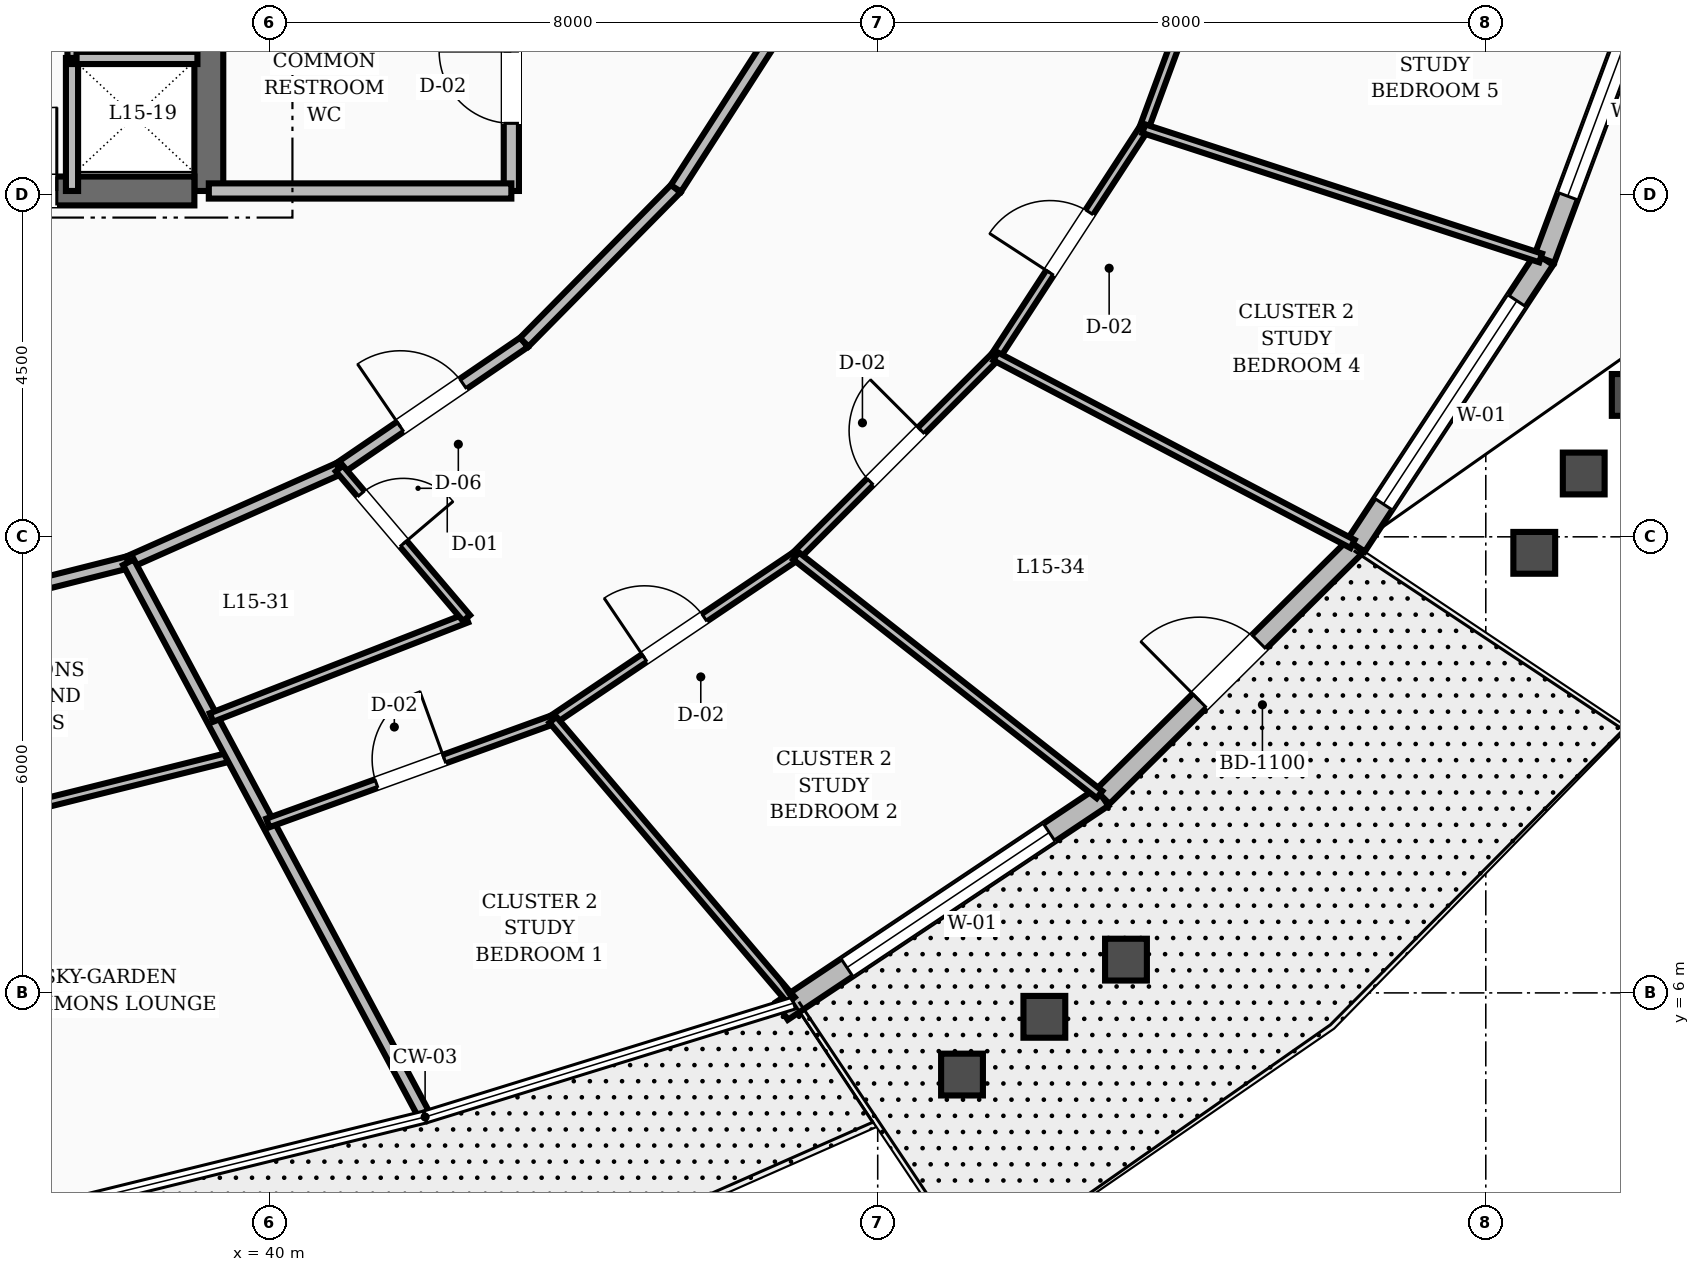
"""IFC4 building model, lengths in metres.
Left out: names, types, materials, properties, quantities, classifications, styles, units other than length and angle.
Written with IfcOpenShell. Run it as: python <this file> out.ifc"""

import sys

from ifc_helpers import new_model, si_unit, direction, frame, frame_2d, origin, place, context, subcontext, project, spatial, rectangle, extrude, element, fill, save


model = new_model("IFC4")
c1 = context("Model", 3, precision=1e-05, world=origin(), true_north=direction((0.0, 1.0)))
c2 = subcontext(c1, "Body", "Model", "MODEL_VIEW")
j1 = project(units=[si_unit("LENGTHUNIT", "METRE"), si_unit("PLANEANGLEUNIT", "RADIAN")], contexts=[c1])
p1 = place(None, origin())
s1 = spatial("IfcSite", under=j1, at=p1, CompositionType="ELEMENT")
p2 = place(p1, origin())
s2 = spatial("IfcBuilding", under=s1, at=p2, CompositionType="ELEMENT")
p3 = place(p2, frame((0.0, 0.0, 62.8)))
s3 = spatial("IfcBuildingStorey", under=s2, at=p3, CompositionType="ELEMENT", Elevation=62.8)
p4 = place(p3, frame((39.2, 16.55, 0.0), z_axis=(0.0, 0.0, 1.0), x_axis=(0.0, 1.0, 0.0)))
e1 = element("IfcWall", 1, at=p4, inside=s3, PredefinedType="SHEAR", context=c2, shape_type="SweptSolid", body=[
    extrude(rectangle(XDim=6.3, YDim=0.38, at=frame_2d((3.15, 0.0))), origin(), (0.0, 0.0, 1.0), 3.6),
])
p5 = place(p3, frame((35.8, 16.55, 0.0), z_axis=(0.0, 0.0, 1.0), x_axis=(1.0, 0.0, 0.0)))
e2 = element("IfcWall", 2, at=p5, inside=s3, PredefinedType="SHEAR", context=c2, shape_type="SweptSolid", body=[
    extrude(rectangle(XDim=3.21, YDim=0.38, at=frame_2d((1.605, 0.0))), origin(), (0.0, 0.0, 1.0), 3.6),
])
p6 = place(p5, frame((0.3, 0.0, 0.0)))
e3 = element("IfcOpeningElement", 3, at=p6, cuts=e2, PredefinedType="OPENING", context=c2, shape_type="SweptSolid", body=[
    extrude(rectangle(XDim=1.1, YDim=2.1, at=frame_2d((0.55, 1.05))), frame((0.0, 0.2, 0.0), z_axis=(0.0, -1.0, 0.0), x_axis=(1.0, 0.0, 0.0)), (0.0, 0.0, 1.0), 0.4),
])
p7 = place(p3, frame((46.74, 5.762, 0.0), z_axis=(0.0, 0.0, 1.0), x_axis=(0.831679795374, 0.555255542941, 0.0)))
e4 = element("IfcWall", 4, at=p7, inside=s3, PredefinedType="STANDARD", context=c2, shape_type="SweptSolid", body=[
    extrude(rectangle(XDim=5.071, YDim=0.28, at=frame_2d((2.536, 0.0))), origin(), (0.0, 0.0, 1.0), 2.71),
])
p8 = place(p7, frame((1.029, 0.0, 0.8)))
e5 = element("IfcOpeningElement", 5, at=p8, cuts=e4, PredefinedType="OPENING", context=c2, shape_type="SweptSolid", body=[
    extrude(rectangle(XDim=3.2, YDim=1.65, at=frame_2d((1.6, 0.825))), frame((0.0, 0.15, 0.0), z_axis=(0.0, -1.0, 0.0), x_axis=(1.0, 0.0, 0.0)), (0.0, 0.0, 1.0), 0.3),
])
p9 = place(p3, frame((50.958, 8.578, 0.0), z_axis=(0.0, 0.0, 1.0), x_axis=(0.710194142887, 0.704005880238, 0.0)))
e6 = element("IfcWall", 6, at=p9, inside=s3, PredefinedType="STANDARD", context=c2, shape_type="SweptSolid", body=[
    extrude(rectangle(XDim=4.695, YDim=0.26, at=frame_2d((2.347, 0.0))), origin(), (0.0, 0.0, 1.0), 2.71),
])
p10 = place(p9, frame((1.797, 0.0, 0.0)))
e7 = element("IfcOpeningElement", 7, at=p10, cuts=e6, PredefinedType="OPENING", context=c2, shape_type="SweptSolid", body=[
    extrude(rectangle(XDim=1.1, YDim=2.15, at=frame_2d((0.55, 1.075))), frame((0.0, 0.14, 0.0), z_axis=(0.0, -1.0, 0.0), x_axis=(1.0, 0.0, 0.0)), (0.0, 0.0, 1.0), 0.28),
])
p11 = place(p3, frame((54.292, 11.883, 0.0), z_axis=(0.0, 0.0, 1.0), x_axis=(0.54914333256, 0.835728185659, 0.0)))
e8 = element("IfcWall", 8, at=p11, inside=s3, PredefinedType="STANDARD", context=c2, shape_type="SweptSolid", body=[
    extrude(rectangle(XDim=4.512, YDim=0.28, at=frame_2d((2.256, 0.0))), origin(), (0.0, 0.0, 1.0), 2.71),
])
p12 = place(p11, frame((0.656, 0.0, 0.8)))
e9 = element("IfcOpeningElement", 9, at=p12, cuts=e8, PredefinedType="OPENING", context=c2, shape_type="SweptSolid", body=[
    extrude(rectangle(XDim=3.2, YDim=1.65, at=frame_2d((1.6, 0.825))), frame((0.0, 0.15, 0.0), z_axis=(0.0, -1.0, 0.0), x_axis=(1.0, 0.0, 0.0)), (0.0, 0.0, 1.0), 0.3),
])
p13 = place(p3, frame((56.769, 15.654, 0.0), z_axis=(0.0, 0.0, 1.0), x_axis=(0.349376625654, 0.936982376273, 0.0)))
e10 = element("IfcWall", 10, at=p13, inside=s3, PredefinedType="STANDARD", context=c2, shape_type="SweptSolid", body=[
    extrude(rectangle(XDim=4.367, YDim=0.28, at=frame_2d((2.183, 0.0))), origin(), (0.0, 0.0, 1.0), 2.71),
])
p14 = place(p13, frame((0.883, 0.0, 0.8)))
e11 = element("IfcOpeningElement", 11, at=p14, cuts=e10, PredefinedType="OPENING", context=c2, shape_type="SweptSolid", body=[
    extrude(rectangle(XDim=2.6, YDim=1.65, at=frame_2d((1.3, 0.825))), frame((0.0, 0.15, 0.0), z_axis=(0.0, -1.0, 0.0), x_axis=(1.0, 0.0, 0.0)), (0.0, 0.0, 1.0), 0.3),
])
p15 = place(p3, frame((43.18, 16.55, 0.0), z_axis=(0.0, 0.0, 1.0), x_axis=(0.0, 1.0, 0.0)))
e12 = element("IfcWall", 12, at=p15, inside=s3, PredefinedType="SOLIDWALL", context=c2, shape_type="SweptSolid", body=[
    extrude(rectangle(XDim=2.73, YDim=0.2, at=frame_2d((1.365, 0.0))), origin(), (0.0, 0.0, 1.0), 2.71),
])
p16 = place(p15, frame((0.89, 0.0, 0.0)))
e13 = element("IfcOpeningElement", 13, at=p16, cuts=e12, PredefinedType="OPENING", context=c2, shape_type="SweptSolid", body=[
    extrude(rectangle(XDim=0.95, YDim=2.1, at=frame_2d((0.475, 1.05))), frame((0.0, 0.11, 0.0), z_axis=(0.0, -1.0, 0.0), x_axis=(1.0, 0.0, 0.0)), (0.0, 0.0, 1.0), 0.22),
])
p17 = place(p3, frame((39.2, 16.55, 0.0), z_axis=(0.0, 0.0, 1.0), x_axis=(1.0, 0.0, 0.0)))
e14 = element("IfcWall", 14, at=p17, inside=s3, PredefinedType="SOLIDWALL", context=c2, shape_type="SweptSolid", body=[
    extrude(rectangle(XDim=3.98, YDim=0.2, at=frame_2d((1.99, 0.0))), origin(), (0.0, 0.0, 1.0), 2.71),
])
p18 = place(p3, frame((37.4, 16.55, 0.0), z_axis=(0.0, 0.0, 1.0), x_axis=(0.0, 1.0, 0.0)))
e15 = element("IfcWall", 15, at=p18, inside=s3, PredefinedType="SOLIDWALL", context=c2, shape_type="SweptSolid", body=[
    extrude(rectangle(XDim=1.75, YDim=0.16, at=frame_2d((0.875, 0.0))), origin(), (0.0, 0.0, 1.0), 2.71),
])
p19 = place(p3, frame((37.4, 18.3, 0.0), z_axis=(0.0, 0.0, 1.0), x_axis=(1.0, 0.0, 0.0)))
e16 = element("IfcWall", 16, at=p19, inside=s3, PredefinedType="SOLIDWALL", context=c2, shape_type="SweptSolid", body=[
    extrude(rectangle(XDim=1.65, YDim=0.16, at=frame_2d((0.825, 0.0))), origin(), (0.0, 0.0, 1.0), 2.71),
])
p20 = place(p3, frame((37.4, 18.3, 0.0), z_axis=(0.0, 0.0, 1.0), x_axis=(0.0, 1.0, 0.0)))
e17 = element("IfcWall", 17, at=p20, inside=s3, PredefinedType="PARTITIONING", context=c2, shape_type="SweptSolid", body=[
    extrude(rectangle(XDim=4.45, YDim=0.12, at=frame_2d((2.225, 0.0))), origin(), (0.0, 0.0, 1.0), 2.71),
])
p21 = place(p20, frame((1.75, 0.0, 0.0)))
e18 = element("IfcOpeningElement", 18, at=p21, cuts=e17, PredefinedType="OPENING", context=c2, shape_type="SweptSolid", body=[
    extrude(rectangle(XDim=0.95, YDim=2.1, at=frame_2d((0.475, 1.05))), frame((0.0, 0.07, 0.0), z_axis=(0.0, -1.0, 0.0), x_axis=(1.0, 0.0, 0.0)), (0.0, 0.0, 1.0), 0.14),
])
p22 = place(p3, frame((35.131, 10.906, 0.0), z_axis=(0.0, 0.0, 1.0), x_axis=(0.969608333194, 0.244662380029, 0.0)))
e19 = element("IfcWall", 19, at=p22, inside=s3, PredefinedType="SOLIDWALL", context=c2, shape_type="SweptSolid", body=[
    extrude(rectangle(XDim=3.105, YDim=0.16, at=frame_2d((1.553, 0.0))), origin(), (0.0, 0.0, 1.0), 2.71),
])
p23 = place(p3, frame((38.142, 11.666, 0.0), z_axis=(0.0, 0.0, 1.0), x_axis=(0.913768445178, 0.406235434936, 0.0)))
e20 = element("IfcWall", 20, at=p23, inside=s3, PredefinedType="SOLIDWALL", context=c2, shape_type="SweptSolid", body=[
    extrude(rectangle(XDim=3.037, YDim=0.16, at=frame_2d((1.519, 0.0))), origin(), (0.0, 0.0, 1.0), 2.71),
])
p24 = place(p3, frame((40.917, 12.9, 0.0), z_axis=(0.0, 0.0, 1.0), x_axis=(0.825929039072, 0.563774088104, 0.0)))
e21 = element("IfcWall", 21, at=p24, inside=s3, PredefinedType="SOLIDWALL", context=c2, shape_type="SweptSolid", body=[
    extrude(rectangle(XDim=2.945, YDim=0.16, at=frame_2d((1.472, 0.0))), origin(), (0.0, 0.0, 1.0), 2.71),
])
p25 = place(p24, frame((0.972, 0.0, 0.0)))
e22 = element("IfcOpeningElement", 22, at=p25, cuts=e21, PredefinedType="OPENING", context=c2, shape_type="SweptSolid", body=[
    extrude(rectangle(XDim=1.0, YDim=2.1, at=frame_2d((0.5, 1.05))), frame((0.0, 0.09, 0.0), z_axis=(0.0, -1.0, 0.0), x_axis=(1.0, 0.0, 0.0)), (0.0, 0.0, 1.0), 0.18),
])
p26 = place(p3, frame((43.349, 14.56, 0.0), z_axis=(0.0, 0.0, 1.0), x_axis=(0.702366174226, 0.711815816981, 0.0)))
e23 = element("IfcWall", 23, at=p26, inside=s3, PredefinedType="SOLIDWALL", context=c2, shape_type="SweptSolid", body=[
    extrude(rectangle(XDim=2.842, YDim=0.16, at=frame_2d((1.421, 0.0))), origin(), (0.0, 0.0, 1.0), 2.71),
])
p27 = place(p3, frame((45.345, 16.583, 0.0), z_axis=(0.0, 0.0, 1.0), x_axis=(0.540595670038, 0.841282545603, 0.0)))
e24 = element("IfcWall", 24, at=p27, inside=s3, PredefinedType="SOLIDWALL", context=c2, shape_type="SweptSolid", body=[
    extrude(rectangle(XDim=2.744, YDim=0.16, at=frame_2d((1.372, 0.0))), origin(), (0.0, 0.0, 1.0), 2.71),
])
p28 = place(p3, frame((35.828, 8.195, 0.0), z_axis=(0.0, 0.0, 1.0), x_axis=(0.97032395627, 0.241808643122, 0.0)))
e25 = element("IfcWall", 25, at=p28, inside=s3, PredefinedType="PARTITIONING", context=c2, shape_type="SweptSolid", body=[
    extrude(rectangle(XDim=3.793, YDim=0.12, at=frame_2d((1.896, 0.0))), origin(), (0.0, 0.0, 1.0), 2.71),
])
p29 = place(p3, frame((38.142, 11.666, 0.0), z_axis=(0.0, 0.0, 1.0), x_axis=(0.471604491661, -0.88181018561, 0.0)))
e26 = element("IfcWall", 26, at=p29, inside=s3, PredefinedType="SOLIDWALL", context=c2, shape_type="SweptSolid", body=[
    extrude(rectangle(XDim=8.227, YDim=0.16, at=frame_2d((4.114, 0.0))), origin(), (0.0, 0.0, 1.0), 2.71),
])
p30 = place(p3, frame((39.235, 9.623, 0.0), z_axis=(0.0, 0.0, 1.0), x_axis=(0.931735992912, 0.363136392436, 0.0)))
e27 = element("IfcWall", 27, at=p30, inside=s3, PredefinedType="PARTITIONING", context=c2, shape_type="SweptSolid", body=[
    extrude(rectangle(XDim=3.602, YDim=0.12, at=frame_2d((1.801, 0.0))), origin(), (0.0, 0.0, 1.0), 2.71),
])
p31 = place(p3, frame((40.917, 12.9, 0.0), z_axis=(0.0, 0.0, 1.0), x_axis=(0.647596323354, -0.761983596922, 0.0)))
e28 = element("IfcWall", 28, at=p31, inside=s3, PredefinedType="PARTITIONING", context=c2, shape_type="SweptSolid", body=[
    extrude(rectangle(XDim=2.585, YDim=0.12, at=frame_2d((1.292, 0.0))), origin(), (0.0, 0.0, 1.0), 2.71),
])
p32 = place(p31, frame((0.44, 0.0, 0.0)))
e29 = element("IfcOpeningElement", 29, at=p32, cuts=e28, PredefinedType="OPENING", context=c2, shape_type="SweptSolid", body=[
    extrude(rectangle(XDim=0.86, YDim=2.1, at=frame_2d((0.43, 1.05))), frame((0.0, 0.07, 0.0), z_axis=(0.0, -1.0, 0.0), x_axis=(1.0, 0.0, 0.0)), (0.0, 0.0, 1.0), 0.14),
])
p33 = place(p3, frame((39.977, 8.236, 0.0), z_axis=(0.0, 0.0, 1.0), x_axis=(0.940246590135, 0.340494272696, 0.0)))
e30 = element("IfcWall", 30, at=p33, inside=s3, PredefinedType="PARTITIONING", context=c2, shape_type="SweptSolid", body=[
    extrude(rectangle(XDim=3.988, YDim=0.12, at=frame_2d((1.994, 0.0))), origin(), (0.0, 0.0, 1.0), 2.71),
])
p34 = place(p33, frame((1.519, 0.0, 0.0)))
e31 = element("IfcOpeningElement", 31, at=p34, cuts=e30, PredefinedType="OPENING", context=c2, shape_type="SweptSolid", body=[
    extrude(rectangle(XDim=0.95, YDim=2.1, at=frame_2d((0.475, 1.05))), frame((0.0, 0.07, 0.0), z_axis=(0.0, -1.0, 0.0), x_axis=(1.0, 0.0, 0.0)), (0.0, 0.0, 1.0), 0.14),
])
p35 = place(p3, frame((43.727, 9.594, 0.0), z_axis=(0.0, 0.0, 1.0), x_axis=(0.829352517657, 0.558725694286, 0.0)))
e32 = element("IfcWall", 32, at=p35, inside=s3, PredefinedType="PARTITIONING", context=c2, shape_type="SweptSolid", body=[
    extrude(rectangle(XDim=3.857, YDim=0.12, at=frame_2d((1.928, 0.0))), origin(), (0.0, 0.0, 1.0), 2.71),
])
p36 = place(p35, frame((1.453, 0.0, 0.0)))
e33 = element("IfcOpeningElement", 33, at=p36, cuts=e32, PredefinedType="OPENING", context=c2, shape_type="SweptSolid", body=[
    extrude(rectangle(XDim=0.95, YDim=2.1, at=frame_2d((0.475, 1.05))), frame((0.0, 0.07, 0.0), z_axis=(0.0, -1.0, 0.0), x_axis=(1.0, 0.0, 0.0)), (0.0, 0.0, 1.0), 0.14),
])
p37 = place(p3, frame((43.727, 9.594, 0.0), z_axis=(0.0, 0.0, 1.0), x_axis=(0.647592807169, -0.761986585251, 0.0)))
e34 = element("IfcWall", 34, at=p37, inside=s3, PredefinedType="PARTITIONING", context=c2, shape_type="SweptSolid", body=[
    extrude(rectangle(XDim=4.843, YDim=0.12, at=frame_2d((2.421, 0.0))), origin(), (0.0, 0.0, 1.0), 2.71),
])
p38 = place(p3, frame((46.925, 11.749, 0.0), z_axis=(0.0, 0.0, 1.0), x_axis=(0.707041019105, 0.707172537152, 0.0)))
e35 = element("IfcWall", 35, at=p38, inside=s3, PredefinedType="PARTITIONING", context=c2, shape_type="SweptSolid", body=[
    extrude(rectangle(XDim=3.713, YDim=0.12, at=frame_2d((1.856, 0.0))), origin(), (0.0, 0.0, 1.0), 2.71),
])
p39 = place(p38, frame((1.381, 0.0, 0.0)))
e36 = element("IfcOpeningElement", 36, at=p39, cuts=e35, PredefinedType="OPENING", context=c2, shape_type="SweptSolid", body=[
    extrude(rectangle(XDim=0.95, YDim=2.1, at=frame_2d((0.475, 1.05))), frame((0.0, 0.07, 0.0), z_axis=(0.0, -1.0, 0.0), x_axis=(1.0, 0.0, 0.0)), (0.0, 0.0, 1.0), 0.14),
])
p40 = place(p3, frame((46.925, 11.749, 0.0), z_axis=(0.0, 0.0, 1.0), x_axis=(0.786111489239, -0.618084724359, 0.0)))
e37 = element("IfcWall", 37, at=p40, inside=s3, PredefinedType="PARTITIONING", context=c2, shape_type="SweptSolid", body=[
    extrude(rectangle(XDim=5.08, YDim=0.12, at=frame_2d((2.54, 0.0))), origin(), (0.0, 0.0, 1.0), 2.71),
])
p41 = place(p3, frame((49.55, 14.374, 0.0), z_axis=(0.0, 0.0, 1.0), x_axis=(0.545667594134, 0.838001716414, 0.0)))
e38 = element("IfcWall", 38, at=p41, inside=s3, PredefinedType="PARTITIONING", context=c2, shape_type="SweptSolid", body=[
    extrude(rectangle(XDim=3.574, YDim=0.12, at=frame_2d((1.787, 0.0))), origin(), (0.0, 0.0, 1.0), 2.71),
])
p42 = place(p41, frame((1.312, 0.0, 0.0)))
e39 = element("IfcOpeningElement", 39, at=p42, cuts=e38, PredefinedType="OPENING", context=c2, shape_type="SweptSolid", body=[
    extrude(rectangle(XDim=0.95, YDim=2.1, at=frame_2d((0.475, 1.05))), frame((0.0, 0.07, 0.0), z_axis=(0.0, -1.0, 0.0), x_axis=(1.0, 0.0, 0.0)), (0.0, 0.0, 1.0), 0.14),
])
p43 = place(p3, frame((49.55, 14.374, 0.0), z_axis=(0.0, 0.0, 1.0), x_axis=(0.885275261797, -0.465067426134, 0.0)))
e40 = element("IfcWall", 40, at=p43, inside=s3, PredefinedType="PARTITIONING", context=c2, shape_type="SweptSolid", body=[
    extrude(rectangle(XDim=5.306, YDim=0.12, at=frame_2d((2.653, 0.0))), origin(), (0.0, 0.0, 1.0), 2.71),
])
p44 = place(p3, frame((51.5, 17.369, 0.0), z_axis=(0.0, 0.0, 1.0), x_axis=(0.346625885205, 0.938003462523, 0.0)))
e41 = element("IfcWall", 41, at=p44, inside=s3, PredefinedType="PARTITIONING", context=c2, shape_type="SweptSolid", body=[
    extrude(rectangle(XDim=3.465, YDim=0.12, at=frame_2d((1.733, 0.0))), origin(), (0.0, 0.0, 1.0), 2.71),
])
p45 = place(p44, frame((1.258, 0.0, 0.0)))
e42 = element("IfcOpeningElement", 42, at=p45, cuts=e41, PredefinedType="OPENING", context=c2, shape_type="SweptSolid", body=[
    extrude(rectangle(XDim=0.95, YDim=2.1, at=frame_2d((0.475, 1.05))), frame((0.0, 0.07, 0.0), z_axis=(0.0, -1.0, 0.0), x_axis=(1.0, 0.0, 0.0)), (0.0, 0.0, 1.0), 0.14),
])
p46 = place(p3, frame((51.5, 17.369, 0.0), z_axis=(0.0, 0.0, 1.0), x_axis=(0.950856820047, -0.309630921856, 0.0)))
e43 = element("IfcWall", 43, at=p46, inside=s3, PredefinedType="PARTITIONING", context=c2, shape_type="SweptSolid", body=[
    extrude(rectangle(XDim=5.491, YDim=0.12, at=frame_2d((2.746, 0.0))), origin(), (0.0, 0.0, 1.0), 2.71),
])
p47 = place(p8, origin())
e44 = element("IfcWindow", 44, at=p47, inside=s3, PartitioningType="SINGLE_PANEL", PredefinedType="WINDOW", context=c2, shape_type="SweptSolid", body=[
    extrude(rectangle(XDim=3.2, YDim=1.65, at=frame_2d((1.6, 0.825))), frame((0.0, 0.03, 0.0), z_axis=(0.0, -1.0, 0.0), x_axis=(1.0, 0.0, 0.0)), (0.0, 0.0, 1.0), 0.06),
])
fill(e5, e44)
p48 = place(p10, origin())
e45 = element("IfcDoor", 45, at=p48, inside=s3, OperationType="SINGLE_SWING_LEFT", PredefinedType="DOOR", context=c2, shape_type="SweptSolid", body=[
    extrude(rectangle(XDim=1.1, YDim=2.15, at=frame_2d((0.55, 1.075))), frame((0.0, 0.025, 0.0), z_axis=(0.0, -1.0, 0.0), x_axis=(1.0, 0.0, 0.0)), (0.0, 0.0, 1.0), 0.05),
])
fill(e7, e45)
p49 = place(p12, origin())
e46 = element("IfcWindow", 46, at=p49, inside=s3, PartitioningType="SINGLE_PANEL", PredefinedType="WINDOW", context=c2, shape_type="SweptSolid", body=[
    extrude(rectangle(XDim=3.2, YDim=1.65, at=frame_2d((1.6, 0.825))), frame((0.0, 0.03, 0.0), z_axis=(0.0, -1.0, 0.0), x_axis=(1.0, 0.0, 0.0)), (0.0, 0.0, 1.0), 0.06),
])
fill(e9, e46)
p50 = place(p14, origin())
e47 = element("IfcWindow", 47, at=p50, inside=s3, PartitioningType="SINGLE_PANEL", PredefinedType="WINDOW", context=c2, shape_type="SweptSolid", body=[
    extrude(rectangle(XDim=2.6, YDim=1.65, at=frame_2d((1.3, 0.825))), frame((0.0, 0.03, 0.0), z_axis=(0.0, -1.0, 0.0), x_axis=(1.0, 0.0, 0.0)), (0.0, 0.0, 1.0), 0.06),
])
fill(e11, e47)
p51 = place(p16, origin())
e48 = element("IfcDoor", 48, at=p51, inside=s3, OperationType="SINGLE_SWING_RIGHT", PredefinedType="DOOR", context=c2, shape_type="SweptSolid", body=[
    extrude(rectangle(XDim=0.95, YDim=2.1, at=frame_2d((0.475, 1.05))), frame((0.0, 0.025, 0.0), z_axis=(0.0, -1.0, 0.0), x_axis=(1.0, 0.0, 0.0)), (0.0, 0.0, 1.0), 0.05),
])
fill(e13, e48)
p52 = place(p6, origin())
e49 = element("IfcDoor", 49, at=p52, inside=s3, OperationType="SINGLE_SWING_RIGHT", PredefinedType="DOOR", context=c2, shape_type="SweptSolid", body=[
    extrude(rectangle(XDim=1.1, YDim=2.1, at=frame_2d((0.55, 1.05))), frame((0.0, 0.025, 0.0), z_axis=(0.0, -1.0, 0.0), x_axis=(1.0, 0.0, 0.0)), (0.0, 0.0, 1.0), 0.05),
])
fill(e3, e49)
p53 = place(p32, origin())
e50 = element("IfcDoor", 50, at=p53, inside=s3, OperationType="SINGLE_SWING_RIGHT", PredefinedType="DOOR", context=c2, shape_type="SweptSolid", body=[
    extrude(rectangle(XDim=0.86, YDim=2.1, at=frame_2d((0.43, 1.05))), frame((0.0, 0.025, 0.0), z_axis=(0.0, -1.0, 0.0), x_axis=(1.0, 0.0, 0.0)), (0.0, 0.0, 1.0), 0.05),
])
fill(e29, e50)
p54 = place(p25, origin())
e51 = element("IfcDoor", 51, at=p54, inside=s3, OperationType="SINGLE_SWING_LEFT", PredefinedType="DOOR", context=c2, shape_type="SweptSolid", body=[
    extrude(rectangle(XDim=1.0, YDim=2.1, at=frame_2d((0.5, 1.05))), frame((0.0, 0.025, 0.0), z_axis=(0.0, -1.0, 0.0), x_axis=(1.0, 0.0, 0.0)), (0.0, 0.0, 1.0), 0.05),
])
fill(e22, e51)
p55 = place(p34, origin())
e52 = element("IfcDoor", 52, at=p55, inside=s3, OperationType="SINGLE_SWING_RIGHT", PredefinedType="DOOR", context=c2, shape_type="SweptSolid", body=[
    extrude(rectangle(XDim=0.95, YDim=2.1, at=frame_2d((0.475, 1.05))), frame((0.0, 0.025, 0.0), z_axis=(0.0, -1.0, 0.0), x_axis=(1.0, 0.0, 0.0)), (0.0, 0.0, 1.0), 0.05),
])
fill(e31, e52)
p56 = place(p36, origin())
e53 = element("IfcDoor", 53, at=p56, inside=s3, OperationType="SINGLE_SWING_LEFT", PredefinedType="DOOR", context=c2, shape_type="SweptSolid", body=[
    extrude(rectangle(XDim=0.95, YDim=2.1, at=frame_2d((0.475, 1.05))), frame((0.0, 0.025, 0.0), z_axis=(0.0, -1.0, 0.0), x_axis=(1.0, 0.0, 0.0)), (0.0, 0.0, 1.0), 0.05),
])
fill(e33, e53)
p57 = place(p39, origin())
e54 = element("IfcDoor", 54, at=p57, inside=s3, OperationType="SINGLE_SWING_RIGHT", PredefinedType="DOOR", context=c2, shape_type="SweptSolid", body=[
    extrude(rectangle(XDim=0.95, YDim=2.1, at=frame_2d((0.475, 1.05))), frame((0.0, 0.025, 0.0), z_axis=(0.0, -1.0, 0.0), x_axis=(1.0, 0.0, 0.0)), (0.0, 0.0, 1.0), 0.05),
])
fill(e36, e54)
p58 = place(p42, origin())
e55 = element("IfcDoor", 55, at=p58, inside=s3, OperationType="SINGLE_SWING_LEFT", PredefinedType="DOOR", context=c2, shape_type="SweptSolid", body=[
    extrude(rectangle(XDim=0.95, YDim=2.1, at=frame_2d((0.475, 1.05))), frame((0.0, 0.025, 0.0), z_axis=(0.0, -1.0, 0.0), x_axis=(1.0, 0.0, 0.0)), (0.0, 0.0, 1.0), 0.05),
])
fill(e39, e55)
save(model, sys.argv[1])
